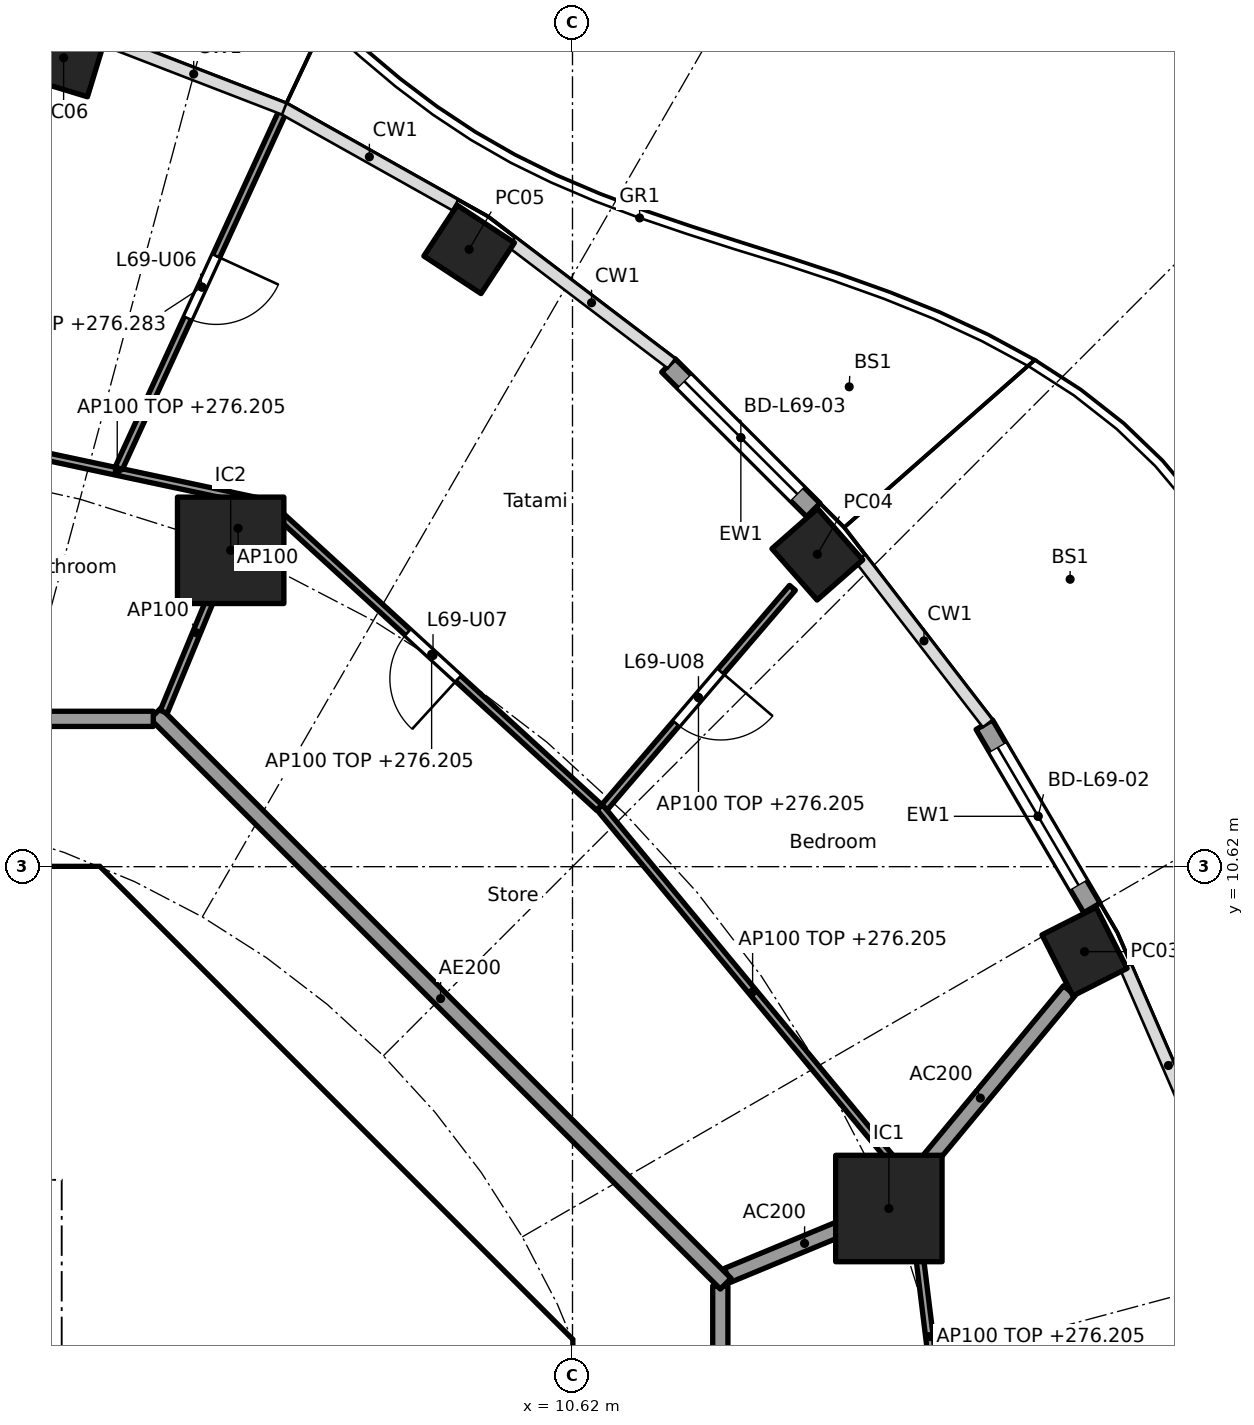
"""IFC4 building model, lengths in metres.
Left out: names, types, materials, properties, quantities, classifications, styles, units other than length and angle.
Written with IfcOpenShell. Run it as: python <this file> out.ifc"""

import sys

from ifc_helpers import new_model, si_unit, direction, frame, frame_2d, origin, origin_2d, place, context, subcontext, project, spatial, polyline, rectangle, hollow_rectangle, outline, extrude, element, fill, save


model = new_model("IFC4")
c1 = context("Model", 3, precision=1e-05, world=origin(), true_north=direction((0.0, 1.0)))
c2 = subcontext(c1, "Body", "Model", "MODEL_VIEW")
j1 = project(units=[si_unit("LENGTHUNIT", "METRE"), si_unit("PLANEANGLEUNIT", "RADIAN")], contexts=[c1])
p1 = place(None, origin())
s1 = spatial("IfcSite", under=j1, at=p1, CompositionType="ELEMENT")
p2 = place(p1, origin())
s2 = spatial("IfcBuilding", under=s1, at=p2, CompositionType="ELEMENT")
p3 = place(p2, frame((0.0, 0.0, 273.3)))
s3 = spatial("IfcBuildingStorey", under=s2, at=p3, CompositionType="ELEMENT", Elevation=273.3)
for number, where, z_axis, x_axis in (
    (1, (17.356, 9.502, 0.0), (0.0, 0.0, 1.0), (-0.452, 0.892, 0.0)),
    (2, (13.841, 14.73, 0.0), (0.0, 0.0, 1.0), (-0.66, 0.751, 0.0)),
    (3, (9.26, 18.741, 0.0), (0.0, 0.0, 1.0), (-0.836, 0.549, 0.0)),
    (4, (3.925, 21.262, 0.0), (0.0, 0.0, 1.0), (-0.957, 0.292, 0.0)),
):
    element("IfcColumn", number, at=place(p3, frame(where, z_axis=z_axis, x_axis=x_axis)), inside=s3, PredefinedType="COLUMN", context=c2, shape_type="SweptSolid", body=[
        extrude(hollow_rectangle(XDim=0.9, YDim=0.8, WallThickness=0.028, at=origin_2d()), origin(), (0.0, 0.0, 1.0), 3.7),
    ])
for number, where, z_axis, x_axis in (
    (5, (14.782, 6.123, 0.0), (0.0, 0.0, 1.0), (1.0, 0.0, 0.0)),
    (6, (6.123, 14.782, 0.0), (0.0, 0.0, 1.0), (1.0, 0.0, 0.0)),
):
    element("IfcColumn", number, at=place(p3, frame(where, z_axis=z_axis, x_axis=x_axis)), inside=s3, PredefinedType="COLUMN", context=c2, shape_type="SweptSolid", body=[
        extrude(rectangle(XDim=1.4, YDim=1.4, at=origin_2d()), origin(), (0.0, 0.0, 1.0), 3.7),
    ])
p4 = place(p3, frame((16.038, 12.489, 0.0), z_axis=(0.0, 0.0, 1.0), x_axis=(0.506371364425, -0.862315511452, 0.0)))
e7 = element("IfcWall", 7, at=p4, inside=s3, PredefinedType="SOLIDWALL", context=c2, shape_type="SweptSolid", body=[
    extrude(rectangle(XDim=2.796, YDim=0.25, at=frame_2d((1.398, 0.0))), origin(), (0.0, 0.0, 1.0), 3.44),
])
p5 = place(p4, frame((0.348, 0.0, 0.0)))
e8 = element("IfcOpeningElement", 8, at=p5, cuts=e7, PredefinedType="OPENING", context=c2, shape_type="SweptSolid", body=[
    extrude(rectangle(XDim=2.1, YDim=2.4, at=frame_2d((1.05, 1.2))), frame((0.0, 0.135, 0.0), z_axis=(0.0, -1.0, 0.0), x_axis=(1.0, 0.0, 0.0)), (0.0, 0.0, 1.0), 0.27),
])
p6 = place(p3, frame((11.882, 17.215, 0.0), z_axis=(0.0, 0.0, 1.0), x_axis=(0.707831739508, -0.706381078841, 0.0)))
e9 = element("IfcWall", 9, at=p6, inside=s3, PredefinedType="SOLIDWALL", context=c2, shape_type="SweptSolid", body=[
    extrude(rectangle(XDim=2.693, YDim=0.25, at=frame_2d((1.346, 0.0))), origin(), (0.0, 0.0, 1.0), 3.44),
])
p7 = place(p6, frame((0.296, 0.0, 0.0)))
e10 = element("IfcOpeningElement", 10, at=p7, cuts=e9, PredefinedType="OPENING", context=c2, shape_type="SweptSolid", body=[
    extrude(rectangle(XDim=2.1, YDim=2.4, at=frame_2d((1.05, 1.2))), frame((0.0, 0.135, 0.0), z_axis=(0.0, -1.0, 0.0), x_axis=(1.0, 0.0, 0.0)), (0.0, 0.0, 1.0), 0.27),
])
p8 = place(p3, frame((9.988, 4.613, 0.0), z_axis=(0.0, 0.0, 1.0), x_axis=(-0.707106781187, 0.707106781187, 0.0)))
e11 = element("IfcWall", 11, at=p8, inside=s3, PredefinedType="SHEAR", context=c2, shape_type="SweptSolid", body=[
    extrude(rectangle(XDim=7.602, YDim=0.6, at=frame_2d((3.801, 0.0))), origin(), (0.0, 0.0, 1.0), 3.44),
])
p9 = place(p8, frame((3.201, 0.0, 0.0)))
e12 = element("IfcOpeningElement", 12, at=p9, cuts=e11, PredefinedType="OPENING", context=c2, shape_type="SweptSolid", body=[
    extrude(rectangle(XDim=1.2, YDim=2.1, at=frame_2d((0.6, 1.05))), frame((0.0, 0.31, 0.0), z_axis=(0.0, -1.0, 0.0), x_axis=(1.0, 0.0, 0.0)), (0.0, 0.0, 1.0), 0.62),
])
p10 = place(p3, frame((4.0, 4.3, 0.0), z_axis=(0.0, 0.0, 1.0), x_axis=(0.0, 1.0, 0.0)))
e13 = element("IfcWall", 13, at=p10, inside=s3, PredefinedType="SOLIDWALL", context=c2, shape_type="SweptSolid", body=[
    extrude(rectangle(XDim=2.2, YDim=0.2, at=frame_2d((1.1, 0.0))), origin(), (0.0, 0.0, 1.0), 3.44),
])
p11 = place(p10, frame((0.55, 0.0, 0.0)))
e14 = element("IfcOpeningElement", 14, at=p11, cuts=e13, PredefinedType="OPENING", context=c2, shape_type="SweptSolid", body=[
    extrude(rectangle(XDim=1.1, YDim=2.1, at=frame_2d((0.55, 1.05))), frame((0.0, 0.11, 0.0), z_axis=(0.0, -1.0, 0.0), x_axis=(1.0, 0.0, 0.0)), (0.0, 0.0, 1.0), 0.22),
])
p12 = place(p3, frame((4.0, 7.025, 0.0), z_axis=(0.0, 0.0, 1.0), x_axis=(0.0, 1.0, 0.0)))
e15 = element("IfcWall", 15, at=p12, inside=s3, PredefinedType="SOLIDWALL", context=c2, shape_type="SweptSolid", body=[
    extrude(rectangle(XDim=3.0, YDim=0.2, at=frame_2d((1.5, 0.0))), origin(), (0.0, 0.0, 1.0), 3.44),
])
p13 = place(p12, frame((0.925, 0.0, 0.0)))
e16 = element("IfcOpeningElement", 16, at=p13, cuts=e15, PredefinedType="OPENING", context=c2, shape_type="SweptSolid", body=[
    extrude(rectangle(XDim=1.1, YDim=2.1, at=frame_2d((0.55, 1.05))), frame((0.0, 0.11, 0.0), z_axis=(0.0, -1.0, 0.0), x_axis=(1.0, 0.0, 0.0)), (0.0, 0.0, 1.0), 0.22),
])
p14 = place(p3, origin())
e17 = element("IfcWall", 17, at=p14, inside=s3, PredefinedType="SHEAR", context=c2, shape_type="SweptSolid", body=[
    extrude(outline(polyline([(-4.152, 10.025), (-4.401, 9.776), (-4.825, 10.2), (-4.401, 10.625), (4.401, 10.625), (4.825, 10.2), (4.401, 9.776), (4.152, 10.025), (-4.152, 10.025)])), origin(), (0.0, 0.0, 1.0), 3.44),
])
p15 = place(p3, origin())
e18 = element("IfcWall", 18, at=p15, inside=s3, PredefinedType="SHEAR", context=c2, shape_type="SweptSolid", body=[
    extrude(outline(polyline([(9.776, -4.401), (10.025, -4.152), (10.025, -3.801), (10.025, 4.152), (9.776, 4.401), (10.2, 4.825), (10.625, 4.401), (10.625, -4.401), (10.2, -4.825), (9.776, -4.401)])), origin(), (0.0, 0.0, 1.0), 3.44),
])
p16 = place(p3, origin())
e19 = element("IfcWall", 19, at=p16, inside=s3, PredefinedType="SOLIDWALL", context=c2, shape_type="SweptSolid", body=[
    extrude(outline(polyline([(4.1, 6.5), (-4.1, 6.5), (-4.1, 7.025), (4.1, 7.025), (4.1, 6.5)])), origin(), (0.0, 0.0, 1.0), 3.44),
])
p17 = place(p3, frame((12.657, 5.243, 0.0), z_axis=(0.0, 0.0, 1.0), x_axis=(0.923853160736, 0.382747093259, 0.0)))
e20 = element("IfcWall", 20, at=p17, inside=s3, PredefinedType="PARTITIONING", context=c2, shape_type="SweptSolid", body=[
    extrude(rectangle(XDim=2.2, YDim=0.2, at=frame_2d((1.1, 0.0))), origin(), (0.0, 0.0, 1.0), 3.44),
])
p18 = place(p3, frame((14.814, 6.161, 0.0), z_axis=(0.0, 0.0, 1.0), x_axis=(0.638050520313, 0.769994502272, 0.0)))
e21 = element("IfcWall", 21, at=p18, inside=s3, PredefinedType="PARTITIONING", context=c2, shape_type="SweptSolid", body=[
    extrude(rectangle(XDim=3.673, YDim=0.2, at=frame_2d((1.836, 0.0))), origin(), (0.0, 0.0, 1.0), 3.44),
])
p19 = place(p3, frame((12.565, -5.104, 0.0), z_axis=(0.0, 0.0, 1.0), x_axis=(0.0, 1.0, 0.0)))
e22 = element("IfcWall", 22, at=p19, inside=s3, PredefinedType="PARTITIONING", context=c2, shape_type="SweptSolid", body=[
    extrude(rectangle(XDim=10.209, YDim=0.2, at=frame_2d((5.104, 0.0))), origin(), (0.0, 0.0, 1.0), 3.44),
])
p20 = place(p19, frame((4.604, 0.0, 0.0)))
e23 = element("IfcOpeningElement", 23, at=p20, cuts=e22, PredefinedType="OPENING", context=c2, shape_type="SweptSolid", body=[
    extrude(rectangle(XDim=1.0, YDim=2.1, at=frame_2d((0.5, 1.05))), frame((0.0, 0.11, 0.0), z_axis=(0.0, -1.0, 0.0), x_axis=(1.0, 0.0, 0.0)), (0.0, 0.0, 1.0), 0.22),
])
p21 = place(p3, frame((12.635, 5.134, 0.0), z_axis=(0.0, 0.0, 1.0), x_axis=(-0.707106781187, 0.707106781187, 0.0)))
e24 = element("IfcWall", 24, at=p21, inside=s3, PredefinedType="PARTITIONING", context=c2, shape_type="SweptSolid", body=[
    extrude(rectangle(XDim=10.609, YDim=0.2, at=frame_2d((5.305, 0.0))), origin(), (0.0, 0.0, 1.0), 3.44),
])
p22 = place(p3, frame((5.104, 12.565, 0.0), z_axis=(0.0, 0.0, 1.0), x_axis=(-1.0, 0.0, 0.0)))
e25 = element("IfcWall", 25, at=p22, inside=s3, PredefinedType="PARTITIONING", context=c2, shape_type="SweptSolid", body=[
    extrude(rectangle(XDim=10.409, YDim=0.2, at=frame_2d((5.205, 0.0))), origin(), (0.0, 0.0, 1.0), 3.44),
])
p23 = place(p22, frame((4.604, 0.0, 0.0)))
e26 = element("IfcOpeningElement", 26, at=p23, cuts=e25, PredefinedType="OPENING", context=c2, shape_type="SweptSolid", body=[
    extrude(rectangle(XDim=1.0, YDim=2.1, at=frame_2d((0.5, 1.05))), frame((0.0, 0.11, 0.0), z_axis=(0.0, -1.0, 0.0), x_axis=(1.0, 0.0, 0.0)), (0.0, 0.0, 1.0), 0.22),
])
p24 = place(p3, frame((15.552, 2.508, 0.0), z_axis=(0.0, 0.0, 1.0), x_axis=(-0.12196293976, 0.992534654974, 0.0)))
e27 = element("IfcWall", 27, at=p24, inside=s3, PredefinedType="PARTITIONING", context=c2, shape_type="SweptSolid", body=[
    extrude(rectangle(XDim=3.887, YDim=0.1, at=frame_2d((1.944, 0.0))), origin(), (0.0, 0.0, 1.0), 2.905),
])
p25 = place(p3, frame((15.002, 6.543, 0.0), z_axis=(0.0, 0.0, 1.0), x_axis=(-0.637932656528, 0.770092154054, 0.0)))
e28 = element("IfcWall", 28, at=p25, inside=s3, PredefinedType="PARTITIONING", context=c2, shape_type="SweptSolid", body=[
    extrude(rectangle(XDim=6.311, YDim=0.1, at=frame_2d((3.155, 0.0))), origin(), (0.0, 0.0, 1.0), 2.905),
])
p26 = place(p3, frame((11.041, 11.402, 0.0), z_axis=(0.0, 0.0, 1.0), x_axis=(0.650558544325, 0.759456108282, 0.0)))
e29 = element("IfcWall", 29, at=p26, inside=s3, PredefinedType="PARTITIONING", context=c2, shape_type="SweptSolid", body=[
    extrude(rectangle(XDim=3.8, YDim=0.1, at=frame_2d((1.9, 0.0))), origin(), (0.0, 0.0, 1.0), 2.905),
])
p27 = place(p26, frame((1.45, 0.0, 0.0)))
e30 = element("IfcOpeningElement", 30, at=p27, cuts=e29, PredefinedType="OPENING", context=c2, shape_type="SweptSolid", body=[
    extrude(rectangle(XDim=0.9, YDim=2.1, at=frame_2d((0.45, 1.05))), frame((0.0, 0.06, 0.0), z_axis=(0.0, -1.0, 0.0), x_axis=(1.0, 0.0, 0.0)), (0.0, 0.0, 1.0), 0.12),
])
p28 = place(p3, frame((10.972, 11.398, 0.0), z_axis=(0.0, 0.0, 1.0), x_axis=(-0.737838738013, 0.674977034193, 0.0)))
e31 = element("IfcWall", 31, at=p28, inside=s3, PredefinedType="PARTITIONING", context=c2, shape_type="SweptSolid", body=[
    extrude(rectangle(XDim=5.977, YDim=0.1, at=frame_2d((2.989, 0.0))), origin(), (0.0, 0.0, 1.0), 2.905),
])
p29 = place(p28, frame((2.514, 0.0, 0.0)))
e32 = element("IfcOpeningElement", 32, at=p29, cuts=e31, PredefinedType="OPENING", context=c2, shape_type="SweptSolid", body=[
    extrude(rectangle(XDim=0.9, YDim=2.1, at=frame_2d((0.45, 1.05))), frame((0.0, 0.06, 0.0), z_axis=(0.0, -1.0, 0.0), x_axis=(1.0, 0.0, 0.0)), (0.0, 0.0, 1.0), 0.12),
])
p30 = place(p3, frame((5.243, 12.657, 0.0), z_axis=(0.0, 0.0, 1.0), x_axis=(0.382719158442, 0.923864733477, 0.0)))
e33 = element("IfcWall", 33, at=p30, inside=s3, PredefinedType="PARTITIONING", context=c2, shape_type="SweptSolid", body=[
    extrude(rectangle(XDim=2.25, YDim=0.1, at=frame_2d((1.125, 0.0))), origin(), (0.0, 0.0, 1.0), 3.44),
])
p31 = place(p3, frame((6.55, 15.409, 0.0), z_axis=(0.0, 0.0, 1.0), x_axis=(-0.978051195976, 0.208364723621, 0.0)))
e34 = element("IfcWall", 34, at=p31, inside=s3, PredefinedType="PARTITIONING", context=c2, shape_type="SweptSolid", body=[
    extrude(rectangle(XDim=3.924, YDim=0.1, at=frame_2d((1.962, 0.0))), origin(), (0.0, 0.0, 1.0), 2.905),
])
p32 = place(p3, frame((4.651, 15.863, 0.0), z_axis=(0.0, 0.0, 1.0), x_axis=(0.41744196735, 0.908703584176, 0.0)))
e35 = element("IfcWall", 35, at=p32, inside=s3, PredefinedType="PARTITIONING", context=c2, shape_type="SweptSolid", body=[
    extrude(rectangle(XDim=5.242, YDim=0.1, at=frame_2d((2.621, 0.0))), origin(), (0.0, 0.0, 1.0), 2.983),
])
p33 = place(p32, frame((2.171, 0.0, 0.0)))
e36 = element("IfcOpeningElement", 36, at=p33, cuts=e35, PredefinedType="OPENING", context=c2, shape_type="SweptSolid", body=[
    extrude(rectangle(XDim=0.9, YDim=2.1, at=frame_2d((0.45, 1.05))), frame((0.0, 0.06, 0.0), z_axis=(0.0, -1.0, 0.0), x_axis=(1.0, 0.0, 0.0)), (0.0, 0.0, 1.0), 0.12),
])
p34 = place(p3, frame((6.388, 15.29, 0.0), z_axis=(0.0, 0.0, 1.0), x_axis=(-0.610612392422, -0.791929609385, 0.0)))
e37 = element("IfcWall", 37, at=p34, inside=s3, PredefinedType="PARTITIONING", context=c2, shape_type="SweptSolid", body=[
    extrude(rectangle(XDim=0.549, YDim=0.1, at=frame_2d((0.275, 0.0))), origin(), (0.0, 0.0, 1.0), 3.44),
])
p35 = place(p5, origin())
e38 = element("IfcDoor", 38, at=p35, inside=s3, OperationType="SLIDING_TO_LEFT", PredefinedType="DOOR", context=c2, shape_type="SweptSolid", body=[
    extrude(rectangle(XDim=2.1, YDim=2.4, at=frame_2d((1.05, 1.2))), frame((0.0, 0.025, 0.0), z_axis=(0.0, -1.0, 0.0), x_axis=(1.0, 0.0, 0.0)), (0.0, 0.0, 1.0), 0.05),
])
fill(e8, e38)
p36 = place(p7, origin())
e39 = element("IfcDoor", 39, at=p36, inside=s3, OperationType="SLIDING_TO_LEFT", PredefinedType="DOOR", context=c2, shape_type="SweptSolid", body=[
    extrude(rectangle(XDim=2.1, YDim=2.4, at=frame_2d((1.05, 1.2))), frame((0.0, 0.025, 0.0), z_axis=(0.0, -1.0, 0.0), x_axis=(1.0, 0.0, 0.0)), (0.0, 0.0, 1.0), 0.05),
])
fill(e10, e39)
p37 = place(p11, origin())
e40 = element("IfcDoor", 40, at=p37, inside=s3, OperationType="DOUBLE_DOOR_SLIDING", PredefinedType="DOOR", context=c2, shape_type="SweptSolid", body=[
    extrude(rectangle(XDim=1.1, YDim=2.1, at=frame_2d((0.55, 1.05))), frame((0.0, 0.025, 0.0), z_axis=(0.0, -1.0, 0.0), x_axis=(1.0, 0.0, 0.0)), (0.0, 0.0, 1.0), 0.05),
])
fill(e14, e40)
p38 = place(p13, origin())
e41 = element("IfcDoor", 41, at=p38, inside=s3, OperationType="SINGLE_SWING_LEFT", PredefinedType="DOOR", context=c2, shape_type="SweptSolid", body=[
    extrude(rectangle(XDim=1.1, YDim=2.1, at=frame_2d((0.55, 1.05))), frame((0.0, 0.025, 0.0), z_axis=(0.0, -1.0, 0.0), x_axis=(1.0, 0.0, 0.0)), (0.0, 0.0, 1.0), 0.05),
])
fill(e16, e41)
p39 = place(p9, origin())
e42 = element("IfcDoor", 42, at=p39, inside=s3, OperationType="SINGLE_SWING_RIGHT", PredefinedType="DOOR", context=c2, shape_type="SweptSolid", body=[
    extrude(rectangle(XDim=1.2, YDim=2.1, at=frame_2d((0.6, 1.05))), frame((0.0, 0.025, 0.0), z_axis=(0.0, -1.0, 0.0), x_axis=(1.0, 0.0, 0.0)), (0.0, 0.0, 1.0), 0.05),
])
fill(e12, e42)
p40 = place(p33, frame((0.9, 0.0, 0.0), x_axis=(-1.0, 0.0, 0.0)))
e43 = element("IfcDoor", 43, at=p40, inside=s3, OperationType="SINGLE_SWING_LEFT", PredefinedType="DOOR", context=c2, shape_type="SweptSolid", body=[
    extrude(rectangle(XDim=0.9, YDim=2.1, at=frame_2d((0.45, 1.05))), frame((0.0, 0.025, 0.0), z_axis=(0.0, -1.0, 0.0), x_axis=(1.0, 0.0, 0.0)), (0.0, 0.0, 1.0), 0.05),
])
fill(e36, e43)
p41 = place(p29, origin())
e44 = element("IfcDoor", 44, at=p41, inside=s3, OperationType="SINGLE_SWING_LEFT", PredefinedType="DOOR", context=c2, shape_type="SweptSolid", body=[
    extrude(rectangle(XDim=0.9, YDim=2.1, at=frame_2d((0.45, 1.05))), frame((0.0, 0.025, 0.0), z_axis=(0.0, -1.0, 0.0), x_axis=(1.0, 0.0, 0.0)), (0.0, 0.0, 1.0), 0.05),
])
fill(e32, e44)
p42 = place(p27, frame((0.9, 0.0, 0.0), x_axis=(-1.0, 0.0, 0.0)))
e45 = element("IfcDoor", 45, at=p42, inside=s3, OperationType="SINGLE_SWING_LEFT", PredefinedType="DOOR", context=c2, shape_type="SweptSolid", body=[
    extrude(rectangle(XDim=0.9, YDim=2.1, at=frame_2d((0.45, 1.05))), frame((0.0, 0.025, 0.0), z_axis=(0.0, -1.0, 0.0), x_axis=(1.0, 0.0, 0.0)), (0.0, 0.0, 1.0), 0.05),
])
fill(e30, e45)
save(model, sys.argv[1])
